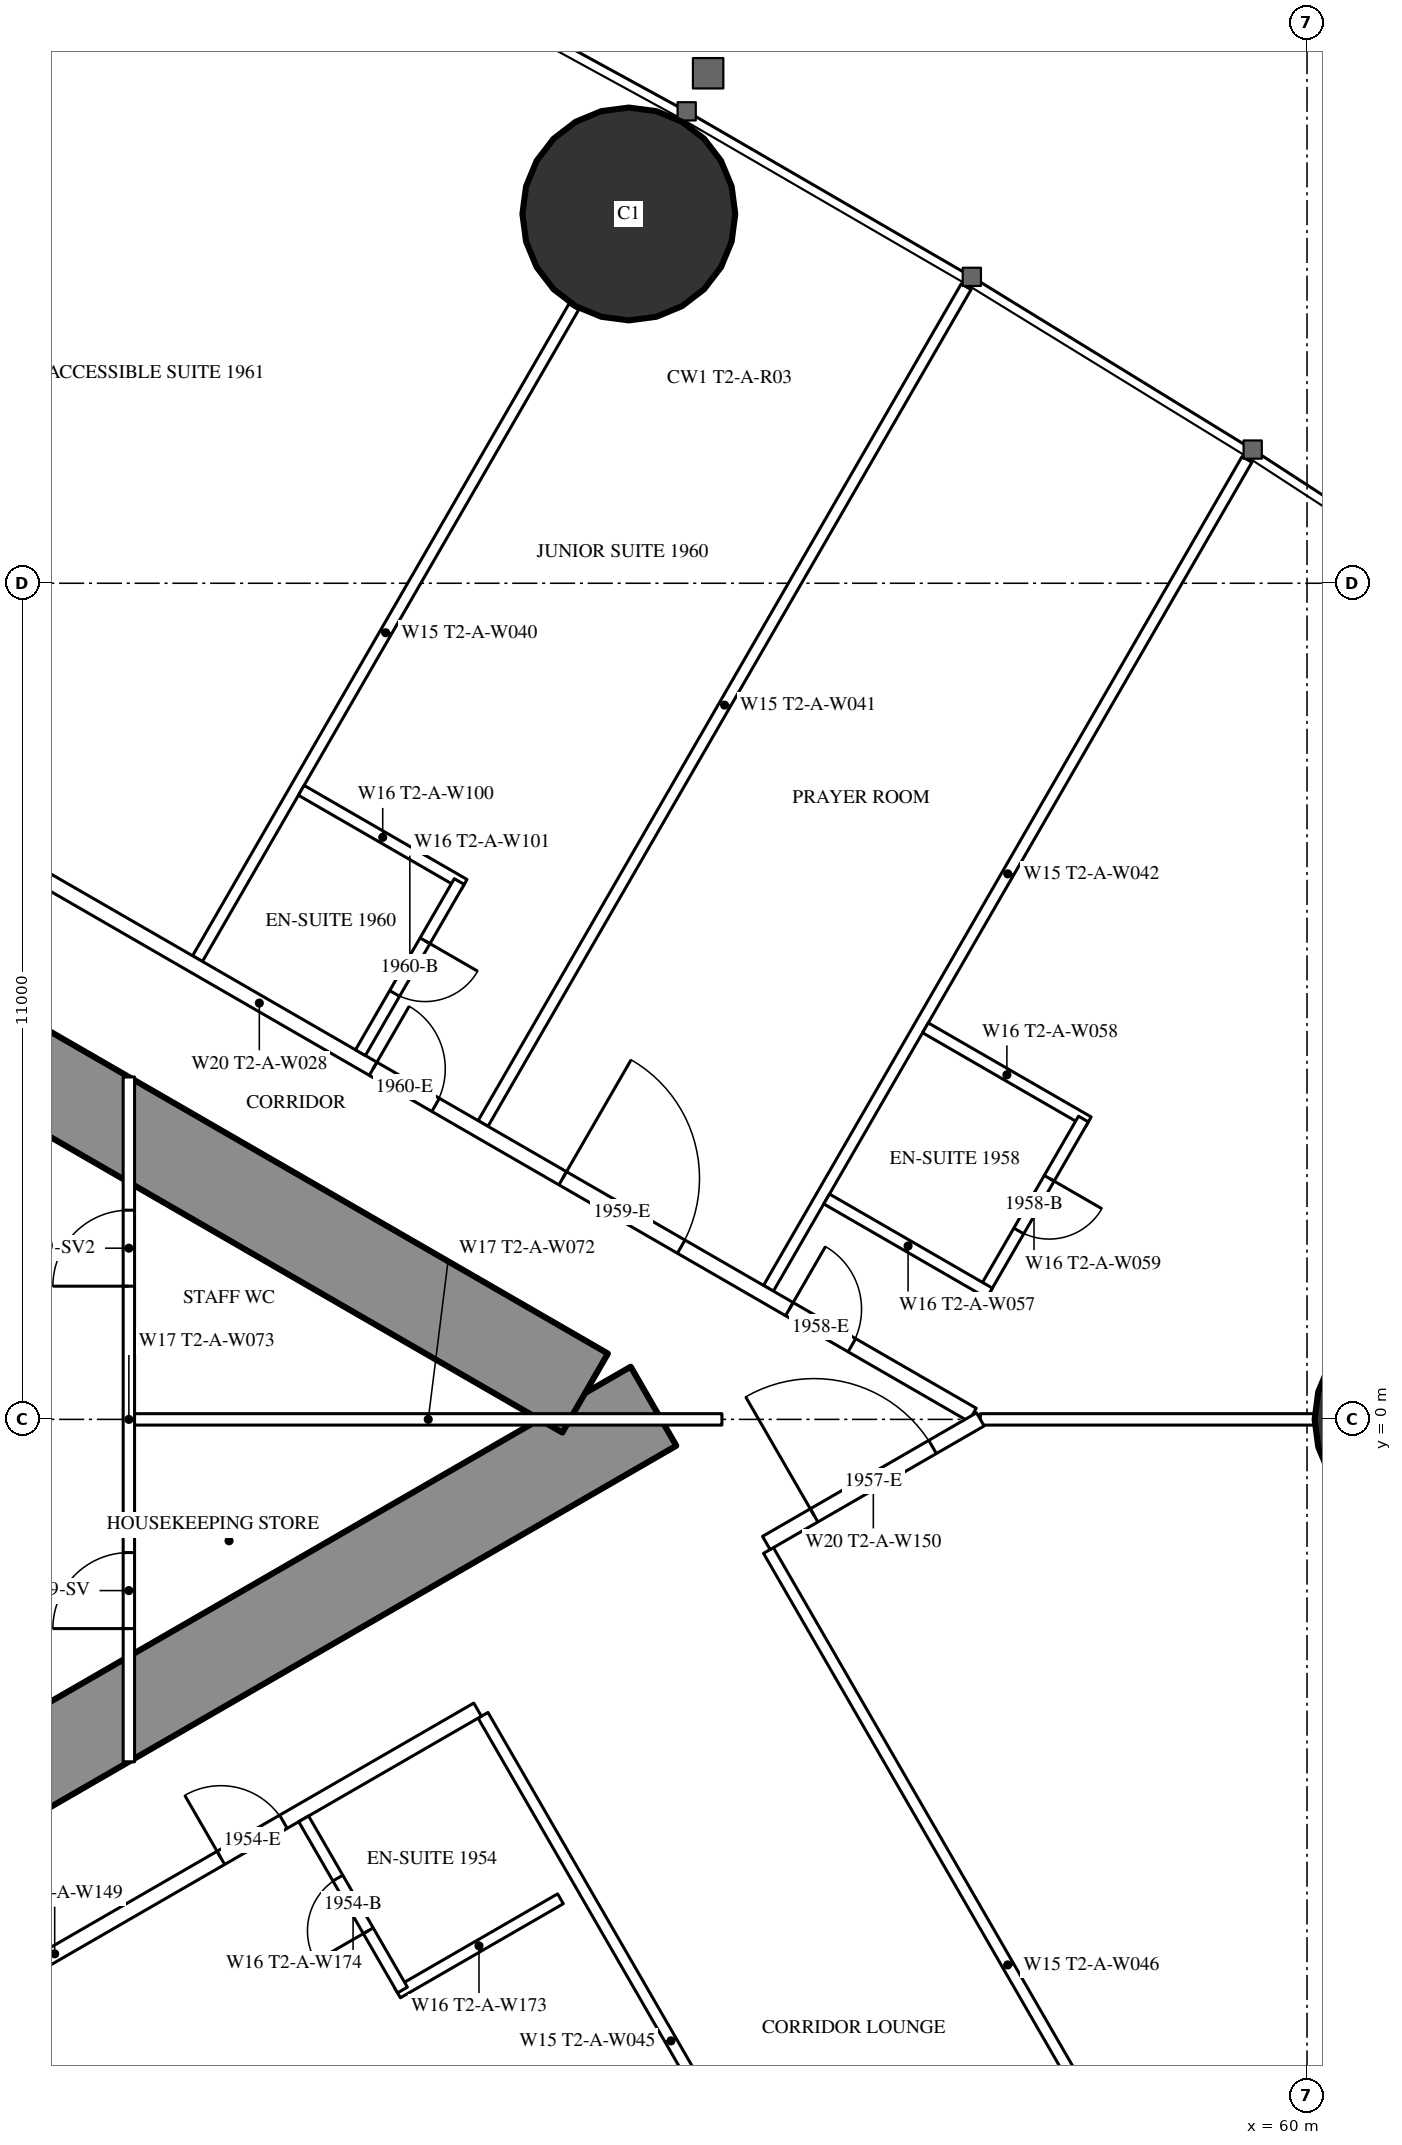
"""IFC4 building model, lengths in metres.
Left out: names, types, materials, properties, quantities, classifications, styles, units other than length and angle.
Written with IfcOpenShell. Run it as: python <this file> out.ifc"""

import sys

from ifc_helpers import new_model, si_unit, direction, frame, frame_2d, origin, origin_2d, place, context, subcontext, project, spatial, rectangle, hollow_circle, extrude, element, fill, save


model = new_model("IFC4")
c1 = context("Model", 3, precision=1e-05, world=origin(), true_north=direction((0.0, 1.0)))
c2 = subcontext(c1, "Body", "Model", "MODEL_VIEW")
j1 = project(units=[si_unit("LENGTHUNIT", "METRE"), si_unit("PLANEANGLEUNIT", "RADIAN")], contexts=[c1])
p1 = place(None, origin())
s1 = spatial("IfcSite", under=j1, at=p1, CompositionType="ELEMENT")
p2 = place(p1, origin())
s2 = spatial("IfcBuilding", under=s1, at=p2, CompositionType="ELEMENT")
p3 = place(p2, frame((0.0, 0.0, 74.0)))
s3 = spatial("IfcBuildingStorey", under=s2, at=p3, CompositionType="ELEMENT", Elevation=74.0)
p4 = place(p3, frame((51.078, 15.858, 0.0), z_axis=(0.0, 0.0, 1.0), x_axis=(1.0, 0.0, 0.0)))
e1 = element("IfcColumn", 1, at=p4, inside=s3, PredefinedType="COLUMN", context=c2, shape_type="SweptSolid", body=[
    extrude(hollow_circle(Radius=1.4, WallThickness=0.12, at=origin_2d()), origin(), (0.0, 0.0, 1.0), 3.5),
])
p5 = place(p3, frame((61.5, 0.0, 0.0), z_axis=(0.0, 0.0, 1.0), x_axis=(1.0, 0.0, 0.0)))
e2 = element("IfcColumn", 2, at=p5, inside=s3, PredefinedType="COLUMN", context=c2, shape_type="SweptSolid", body=[
    extrude(hollow_circle(Radius=1.4, WallThickness=0.1, at=origin_2d()), origin(), (0.0, 0.0, 1.0), 3.5),
])
p6 = place(p3, frame((27.2, -13.8, 0.0), z_axis=(0.0, 0.0, 1.0), x_axis=(0.866027159892, 0.499996958321, 0.0)))
e3 = element("IfcWall", 3, at=p6, inside=s3, PredefinedType="SHEAR", context=c2, shape_type="SweptSolid", body=[
    extrude(rectangle(XDim=27.947, YDim=1.2, at=frame_2d((13.973, 0.0))), origin(), (0.0, 0.0, 1.0), 3.5),
])
p7 = place(p6, frame((4.6, 0.0, 0.0)))
e4 = element("IfcOpeningElement", 4, at=p7, cuts=e3, PredefinedType="OPENING", context=c2, shape_type="SweptSolid", body=[
    extrude(rectangle(XDim=1.0, YDim=2.2, at=frame_2d((0.5, 1.1))), frame((0.0, 0.61, 0.0), z_axis=(0.0, -1.0, 0.0), x_axis=(1.0, 0.0, 0.0)), (0.0, 0.0, 1.0), 1.22),
])
p8 = place(p6, frame((13.395, 0.0, 0.0)))
e5 = element("IfcOpeningElement", 5, at=p8, cuts=e3, PredefinedType="OPENING", context=c2, shape_type="SweptSolid", body=[
    extrude(rectangle(XDim=1.8, YDim=2.2, at=frame_2d((0.9, 1.1))), frame((0.0, 0.61, 0.0), z_axis=(0.0, -1.0, 0.0), x_axis=(1.0, 0.0, 0.0)), (0.0, 0.0, 1.0), 1.22),
])
p9 = place(p3, frame((27.2, 13.8, 0.0), z_axis=(0.0, 0.0, 1.0), x_axis=(0.866024515034, -0.500001539357, 0.0)))
e6 = element("IfcWall", 6, at=p9, inside=s3, PredefinedType="SHEAR", context=c2, shape_type="SweptSolid", body=[
    extrude(rectangle(XDim=26.907, YDim=1.2, at=frame_2d((13.454, 0.0))), origin(), (0.0, 0.0, 1.0), 3.5),
])
p10 = place(p9, frame((4.6, 0.0, 0.0)))
e7 = element("IfcOpeningElement", 7, at=p10, cuts=e6, PredefinedType="OPENING", context=c2, shape_type="SweptSolid", body=[
    extrude(rectangle(XDim=1.0, YDim=2.2, at=frame_2d((0.5, 1.1))), frame((0.0, 0.61, 0.0), z_axis=(0.0, -1.0, 0.0), x_axis=(1.0, 0.0, 0.0)), (0.0, 0.0, 1.0), 1.22),
])
p11 = place(p9, frame((13.395, 0.0, 0.0)))
e8 = element("IfcOpeningElement", 8, at=p11, cuts=e6, PredefinedType="OPENING", context=c2, shape_type="SweptSolid", body=[
    extrude(rectangle(XDim=1.8, YDim=2.2, at=frame_2d((0.9, 1.1))), frame((0.0, 0.61, 0.0), z_axis=(0.0, -1.0, 0.0), x_axis=(1.0, 0.0, 0.0)), (0.0, 0.0, 1.0), 1.22),
])
p12 = place(p3, frame((41.647, -8.23, 0.0), z_axis=(0.0, 0.0, 1.0), x_axis=(0.49998590462, -0.866033541603, 0.0)))
e9 = element("IfcWall", 9, at=p12, inside=s3, PredefinedType="PARTITIONING", context=c2, shape_type="SweptSolid", body=[
    extrude(rectangle(XDim=12.621, YDim=0.15, at=frame_2d((6.311, 0.0))), origin(), (0.0, 0.0, 1.0), 3.25),
])
p13 = place(p3, frame((49.159, -3.893, 0.0), z_axis=(0.0, 0.0, 1.0), x_axis=(0.499998773722, -0.866026111775, 0.0)))
e10 = element("IfcWall", 10, at=p13, inside=s3, PredefinedType="PARTITIONING", context=c2, shape_type="SweptSolid", body=[
    extrude(rectangle(XDim=9.892, YDim=0.15, at=frame_2d((4.946, 0.0))), origin(), (0.0, 0.0, 1.0), 2.25),
])
p14 = place(p3, frame((52.915, -1.725, 0.0), z_axis=(0.0, 0.0, 1.0), x_axis=(0.499997163113, -0.866027041656, 0.0)))
e11 = element("IfcWall", 11, at=p14, inside=s3, PredefinedType="PARTITIONING", context=c2, shape_type="SweptSolid", body=[
    extrude(rectangle(XDim=12.591, YDim=0.15, at=frame_2d((6.295, 0.0))), origin(), (0.0, 0.0, 1.0), 3.25),
])
p15 = place(p3, frame((45.403, 6.062, 0.0), z_axis=(0.0, 0.0, 1.0), x_axis=(0.500013434677, 0.866017647131, 0.0)))
e12 = element("IfcWall", 12, at=p15, inside=s3, PredefinedType="PARTITIONING", context=c2, shape_type="SweptSolid", body=[
    extrude(rectangle(XDim=9.902, YDim=0.15, at=frame_2d((4.951, 0.0))), origin(), (0.0, 0.0, 1.0), 2.25),
])
p16 = place(p3, frame((49.159, 3.893, 0.0), z_axis=(0.0, 0.0, 1.0), x_axis=(0.499995664361, 0.866027906952, 0.0)))
e13 = element("IfcWall", 13, at=p16, inside=s3, PredefinedType="PARTITIONING", context=c2, shape_type="SweptSolid", body=[
    extrude(rectangle(XDim=12.711, YDim=0.15, at=frame_2d((6.356, 0.0))), origin(), (0.0, 0.0, 1.0), 3.25),
])
p17 = place(p3, frame((52.915, 1.725, 0.0), z_axis=(0.0, 0.0, 1.0), x_axis=(0.499997163113, 0.866027041656, 0.0)))
e14 = element("IfcWall", 14, at=p17, inside=s3, PredefinedType="PARTITIONING", context=c2, shape_type="SweptSolid", body=[
    extrude(rectangle(XDim=12.591, YDim=0.15, at=frame_2d((6.295, 0.0))), origin(), (0.0, 0.0, 1.0), 3.25),
])
p18 = place(p3, frame((55.702, 0.0, 0.0), z_axis=(0.0, 0.0, 1.0), x_axis=(1.0, 0.0, 0.0)))
e15 = element("IfcWall", 15, at=p18, inside=s3, PredefinedType="PARTITIONING", context=c2, shape_type="SweptSolid", body=[
    extrude(rectangle(XDim=16.117, YDim=0.15, at=frame_2d((8.059, 0.0))), origin(), (0.0, 0.0, 1.0), 2.25),
])
p19 = place(p3, frame((36.834, 10.894, 0.0), z_axis=(0.0, 0.0, 1.0), x_axis=(0.866028157229, -0.499995230863, 0.0)))
e16 = element("IfcWall", 16, at=p19, inside=s3, PredefinedType="PARTITIONING", context=c2, shape_type="SweptSolid", body=[
    extrude(rectangle(XDim=21.667, YDim=0.2, at=frame_2d((10.833, 0.0))), origin(), (0.0, 0.0, 1.0), 3.25),
])
p20 = place(p19, frame((18.885, 0.0, 0.0)))
e17 = element("IfcOpeningElement", 17, at=p20, cuts=e16, PredefinedType="OPENING", context=c2, shape_type="SweptSolid", body=[
    extrude(rectangle(XDim=0.95, YDim=2.2, at=frame_2d((0.475, 1.1))), frame((0.0, 0.11, 0.0), z_axis=(0.0, -1.0, 0.0), x_axis=(1.0, 0.0, 0.0)), (0.0, 0.0, 1.0), 0.22),
])
p21 = place(p19, frame((15.443, 0.0, 0.0)))
e18 = element("IfcOpeningElement", 18, at=p21, cuts=e16, PredefinedType="OPENING", context=c2, shape_type="SweptSolid", body=[
    extrude(rectangle(XDim=1.8, YDim=2.2, at=frame_2d((0.9, 1.1))), frame((0.0, 0.11, 0.0), z_axis=(0.0, -1.0, 0.0), x_axis=(1.0, 0.0, 0.0)), (0.0, 0.0, 1.0), 0.22),
])
p22 = place(p19, frame((12.562, 0.0, 0.0)))
e19 = element("IfcOpeningElement", 19, at=p22, cuts=e16, PredefinedType="OPENING", context=c2, shape_type="SweptSolid", body=[
    extrude(rectangle(XDim=0.95, YDim=2.2, at=frame_2d((0.475, 1.1))), frame((0.0, 0.11, 0.0), z_axis=(0.0, -1.0, 0.0), x_axis=(1.0, 0.0, 0.0)), (0.0, 0.0, 1.0), 0.22),
])
p23 = place(p19, frame((4.292, 0.0, 0.0)))
e20 = element("IfcOpeningElement", 20, at=p23, cuts=e16, PredefinedType="OPENING", context=c2, shape_type="SweptSolid", body=[
    extrude(rectangle(XDim=1.0, YDim=2.2, at=frame_2d((0.5, 1.1))), frame((0.0, 0.11, 0.0), z_axis=(0.0, -1.0, 0.0), x_axis=(1.0, 0.0, 0.0)), (0.0, 0.0, 1.0), 0.22),
])
p24 = place(p3, frame((37.96, -10.243, 0.0), z_axis=(0.0, 0.0, 1.0), x_axis=(0.866030548046, 0.499991089772, 0.0)))
e21 = element("IfcWall", 21, at=p24, inside=s3, PredefinedType="PARTITIONING", context=c2, shape_type="SweptSolid", body=[
    extrude(rectangle(XDim=12.849, YDim=0.2, at=frame_2d((6.425, 0.0))), origin(), (0.0, 0.0, 1.0), 3.25),
])
p25 = place(p24, frame((8.949, 0.0, 0.0)))
e22 = element("IfcOpeningElement", 22, at=p25, cuts=e21, PredefinedType="OPENING", context=c2, shape_type="SweptSolid", body=[
    extrude(rectangle(XDim=0.95, YDim=2.2, at=frame_2d((0.475, 1.1))), frame((0.0, 0.11, 0.0), z_axis=(0.0, -1.0, 0.0), x_axis=(1.0, 0.0, 0.0)), (0.0, 0.0, 1.0), 0.22),
])
p26 = place(p24, frame((0.6, 0.0, 0.0)))
e23 = element("IfcOpeningElement", 23, at=p26, cuts=e21, PredefinedType="OPENING", context=c2, shape_type="SweptSolid", body=[
    extrude(rectangle(XDim=0.95, YDim=2.2, at=frame_2d((0.475, 1.1))), frame((0.0, 0.11, 0.0), z_axis=(0.0, -1.0, 0.0), x_axis=(1.0, 0.0, 0.0)), (0.0, 0.0, 1.0), 0.22),
])
p27 = place(p3, frame((52.886, -1.626, 0.0), z_axis=(0.0, 0.0, 1.0), x_axis=(0.866030540913, 0.499991102127, 0.0)))
e24 = element("IfcWall", 24, at=p27, inside=s3, PredefinedType="PARTITIONING", context=c2, shape_type="SweptSolid", body=[
    extrude(rectangle(XDim=3.251, YDim=0.2, at=frame_2d((1.626, 0.0))), origin(), (0.0, 0.0, 1.0), 3.25),
])
p28 = place(p27, frame((0.726, 0.0, 0.0)))
e25 = element("IfcOpeningElement", 25, at=p28, cuts=e24, PredefinedType="OPENING", context=c2, shape_type="SweptSolid", body=[
    extrude(rectangle(XDim=1.8, YDim=2.2, at=frame_2d((0.9, 1.1))), frame((0.0, 0.11, 0.0), z_axis=(0.0, -1.0, 0.0), x_axis=(1.0, 0.0, 0.0)), (0.0, 0.0, 1.0), 0.22),
])
p29 = place(p3, frame((48.035, -7.545, 0.0), z_axis=(0.0, 0.0, 1.0), x_axis=(0.866006523861, 0.500032699561, 0.0)))
e26 = element("IfcWall", 26, at=p29, inside=s3, PredefinedType="PARTITIONING", context=c2, shape_type="SweptSolid", body=[
    extrude(rectangle(XDim=2.475, YDim=0.15, at=frame_2d((1.237, 0.0))), origin(), (0.0, 0.0, 1.0), 3.25),
])
p30 = place(p3, frame((46.8, -5.255, 0.0), z_axis=(0.0, 0.0, 1.0), x_axis=(0.500006934395, -0.866021400173, 0.0)))
e27 = element("IfcWall", 27, at=p30, inside=s3, PredefinedType="PARTITIONING", context=c2, shape_type="SweptSolid", body=[
    extrude(rectangle(XDim=2.6, YDim=0.15, at=frame_2d((1.3, 0.0))), origin(), (0.0, 0.0, 1.0), 3.25),
])
p31 = place(p30, frame((0.9, 0.0, 0.0)))
e28 = element("IfcOpeningElement", 28, at=p31, cuts=e27, PredefinedType="OPENING", context=c2, shape_type="SweptSolid", body=[
    extrude(rectangle(XDim=0.8, YDim=2.2, at=frame_2d((0.4, 1.1))), frame((0.0, 0.085, 0.0), z_axis=(0.0, -1.0, 0.0), x_axis=(1.0, 0.0, 0.0)), (0.0, 0.0, 1.0), 0.17),
])
p32 = place(p3, frame((54.98, 5.151, 0.0), z_axis=(0.0, 0.0, 1.0), x_axis=(0.86604923931, -0.499958713387, 0.0)))
e29 = element("IfcWall", 29, at=p32, inside=s3, PredefinedType="PARTITIONING", context=c2, shape_type="SweptSolid", body=[
    extrude(rectangle(XDim=2.475, YDim=0.15, at=frame_2d((1.237, 0.0))), origin(), (0.0, 0.0, 1.0), 3.25),
])
p33 = place(p3, frame((55.758, 1.7, 0.0), z_axis=(0.0, 0.0, 1.0), x_axis=(0.500006934395, 0.866021400173, 0.0)))
e30 = element("IfcWall", 30, at=p33, inside=s3, PredefinedType="PARTITIONING", context=c2, shape_type="SweptSolid", body=[
    extrude(rectangle(XDim=2.6, YDim=0.15, at=frame_2d((1.3, 0.0))), origin(), (0.0, 0.0, 1.0), 3.25),
])
p34 = place(p33, frame((0.9, 0.0, 0.0)))
e31 = element("IfcOpeningElement", 31, at=p34, cuts=e30, PredefinedType="OPENING", context=c2, shape_type="SweptSolid", body=[
    extrude(rectangle(XDim=0.8, YDim=2.2, at=frame_2d((0.4, 1.1))), frame((0.0, 0.085, 0.0), z_axis=(0.0, -1.0, 0.0), x_axis=(1.0, 0.0, 0.0)), (0.0, 0.0, 1.0), 0.17),
])
p35 = place(p3, frame((53.68, 2.9, 0.0), z_axis=(0.0, 0.0, 1.0), x_axis=(0.866006523861, -0.500032699561, 0.0)))
e32 = element("IfcWall", 32, at=p35, inside=s3, PredefinedType="PARTITIONING", context=c2, shape_type="SweptSolid", body=[
    extrude(rectangle(XDim=2.475, YDim=0.15, at=frame_2d((1.237, 0.0))), origin(), (0.0, 0.0, 1.0), 3.25),
])
p36 = place(p3, frame((46.768, 8.276, 0.0), z_axis=(0.0, 0.0, 1.0), x_axis=(0.866031185235, -0.4999899861, 0.0)))
e33 = element("IfcWall", 33, at=p36, inside=s3, PredefinedType="PARTITIONING", context=c2, shape_type="SweptSolid", body=[
    extrude(rectangle(XDim=2.475, YDim=0.15, at=frame_2d((1.238, 0.0))), origin(), (0.0, 0.0, 1.0), 3.25),
])
p37 = place(p3, frame((47.546, 4.824, 0.0), z_axis=(0.0, 0.0, 1.0), x_axis=(0.500006934395, 0.866021400173, 0.0)))
e34 = element("IfcWall", 34, at=p37, inside=s3, PredefinedType="PARTITIONING", context=c2, shape_type="SweptSolid", body=[
    extrude(rectangle(XDim=2.6, YDim=0.15, at=frame_2d((1.3, 0.0))), origin(), (0.0, 0.0, 1.0), 3.25),
])
p38 = place(p37, frame((0.9, 0.0, 0.0)))
e35 = element("IfcOpeningElement", 35, at=p38, cuts=e34, PredefinedType="OPENING", context=c2, shape_type="SweptSolid", body=[
    extrude(rectangle(XDim=0.8, YDim=2.2, at=frame_2d((0.4, 1.1))), frame((0.0, 0.085, 0.0), z_axis=(0.0, -1.0, 0.0), x_axis=(1.0, 0.0, 0.0)), (0.0, 0.0, 1.0), 0.17),
])
p39 = place(p3, frame((44.5, -4.505, 0.0), z_axis=(0.0, 0.0, 1.0), x_axis=(0.0, 1.0, 0.0)))
e36 = element("IfcWall", 36, at=p39, inside=s3, PredefinedType="PARTITIONING", context=c2, shape_type="SweptSolid", body=[
    extrude(rectangle(XDim=9.009, YDim=0.15, at=frame_2d((4.505, 0.0))), origin(), (0.0, 0.0, 1.0), 2.45),
])
p40 = place(p39, frame((1.752, 0.0, 0.0)))
e37 = element("IfcOpeningElement", 37, at=p40, cuts=e36, PredefinedType="OPENING", context=c2, shape_type="SweptSolid", body=[
    extrude(rectangle(XDim=1.0, YDim=2.2, at=frame_2d((0.5, 1.1))), frame((0.0, 0.085, 0.0), z_axis=(0.0, -1.0, 0.0), x_axis=(1.0, 0.0, 0.0)), (0.0, 0.0, 1.0), 0.17),
])
p41 = place(p39, frame((6.257, 0.0, 0.0)))
e38 = element("IfcOpeningElement", 38, at=p41, cuts=e36, PredefinedType="OPENING", context=c2, shape_type="SweptSolid", body=[
    extrude(rectangle(XDim=1.0, YDim=2.2, at=frame_2d((0.5, 1.1))), frame((0.0, 0.085, 0.0), z_axis=(0.0, -1.0, 0.0), x_axis=(1.0, 0.0, 0.0)), (0.0, 0.0, 1.0), 0.17),
])
p42 = place(p3, frame((44.575, 0.0, 0.0), z_axis=(0.0, 0.0, 1.0), x_axis=(1.0, 0.0, 0.0)))
e39 = element("IfcWall", 39, at=p42, inside=s3, PredefinedType="PARTITIONING", context=c2, shape_type="SweptSolid", body=[
    extrude(rectangle(XDim=7.727, YDim=0.15, at=frame_2d((3.864, 0.0))), origin(), (0.0, 0.0, 1.0), 2.25),
])
p43 = place(p31, origin())
e40 = element("IfcDoor", 40, at=p43, inside=s3, OperationType="SINGLE_SWING_RIGHT", PredefinedType="DOOR", context=c2, shape_type="SweptSolid", body=[
    extrude(rectangle(XDim=0.8, YDim=2.2, at=frame_2d((0.4, 1.1))), frame((0.0, 0.025, 0.0), z_axis=(0.0, -1.0, 0.0), x_axis=(1.0, 0.0, 0.0)), (0.0, 0.0, 1.0), 0.05),
])
fill(e28, e40)
p44 = place(p25, origin())
e41 = element("IfcDoor", 41, at=p44, inside=s3, OperationType="SINGLE_SWING_LEFT", PredefinedType="DOOR", context=c2, shape_type="SweptSolid", body=[
    extrude(rectangle(XDim=0.95, YDim=2.2, at=frame_2d((0.475, 1.1))), frame((0.0, 0.025, 0.0), z_axis=(0.0, -1.0, 0.0), x_axis=(1.0, 0.0, 0.0)), (0.0, 0.0, 1.0), 0.05),
])
fill(e22, e41)
p45 = place(p28, origin())
e42 = element("IfcDoor", 42, at=p45, inside=s3, OperationType="DOUBLE_DOOR_SINGLE_SWING", PredefinedType="DOOR", context=c2, shape_type="SweptSolid", body=[
    extrude(rectangle(XDim=1.8, YDim=2.2, at=frame_2d((0.9, 1.1))), frame((0.0, 0.025, 0.0), z_axis=(0.0, -1.0, 0.0), x_axis=(1.0, 0.0, 0.0)), (0.0, 0.0, 1.0), 0.05),
])
fill(e25, e42)
p46 = place(p34, origin())
e43 = element("IfcDoor", 43, at=p46, inside=s3, OperationType="SINGLE_SWING_RIGHT", PredefinedType="DOOR", context=c2, shape_type="SweptSolid", body=[
    extrude(rectangle(XDim=0.8, YDim=2.2, at=frame_2d((0.4, 1.1))), frame((0.0, 0.025, 0.0), z_axis=(0.0, -1.0, 0.0), x_axis=(1.0, 0.0, 0.0)), (0.0, 0.0, 1.0), 0.05),
])
fill(e31, e43)
p47 = place(p20, origin())
e44 = element("IfcDoor", 44, at=p47, inside=s3, OperationType="SINGLE_SWING_LEFT", PredefinedType="DOOR", context=c2, shape_type="SweptSolid", body=[
    extrude(rectangle(XDim=0.95, YDim=2.2, at=frame_2d((0.475, 1.1))), frame((0.0, 0.025, 0.0), z_axis=(0.0, -1.0, 0.0), x_axis=(1.0, 0.0, 0.0)), (0.0, 0.0, 1.0), 0.05),
])
fill(e17, e44)
p48 = place(p21, origin())
e45 = element("IfcDoor", 45, at=p48, inside=s3, OperationType="DOUBLE_DOOR_SINGLE_SWING", PredefinedType="DOOR", context=c2, shape_type="SweptSolid", body=[
    extrude(rectangle(XDim=1.8, YDim=2.2, at=frame_2d((0.9, 1.1))), frame((0.0, 0.025, 0.0), z_axis=(0.0, -1.0, 0.0), x_axis=(1.0, 0.0, 0.0)), (0.0, 0.0, 1.0), 0.05),
])
fill(e18, e45)
p49 = place(p38, origin())
e46 = element("IfcDoor", 46, at=p49, inside=s3, OperationType="SINGLE_SWING_RIGHT", PredefinedType="DOOR", context=c2, shape_type="SweptSolid", body=[
    extrude(rectangle(XDim=0.8, YDim=2.2, at=frame_2d((0.4, 1.1))), frame((0.0, 0.025, 0.0), z_axis=(0.0, -1.0, 0.0), x_axis=(1.0, 0.0, 0.0)), (0.0, 0.0, 1.0), 0.05),
])
fill(e35, e46)
p50 = place(p22, origin())
e47 = element("IfcDoor", 47, at=p50, inside=s3, OperationType="SINGLE_SWING_LEFT", PredefinedType="DOOR", context=c2, shape_type="SweptSolid", body=[
    extrude(rectangle(XDim=0.95, YDim=2.2, at=frame_2d((0.475, 1.1))), frame((0.0, 0.025, 0.0), z_axis=(0.0, -1.0, 0.0), x_axis=(1.0, 0.0, 0.0)), (0.0, 0.0, 1.0), 0.05),
])
fill(e19, e47)
p51 = place(p40, origin())
e48 = element("IfcDoor", 48, at=p51, inside=s3, OperationType="SINGLE_SWING_LEFT", PredefinedType="DOOR", context=c2, shape_type="SweptSolid", body=[
    extrude(rectangle(XDim=1.0, YDim=2.2, at=frame_2d((0.5, 1.1))), frame((0.0, 0.025, 0.0), z_axis=(0.0, -1.0, 0.0), x_axis=(1.0, 0.0, 0.0)), (0.0, 0.0, 1.0), 0.05),
])
fill(e37, e48)
p52 = place(p41, origin())
e49 = element("IfcDoor", 49, at=p52, inside=s3, OperationType="SINGLE_SWING_LEFT", PredefinedType="DOOR", context=c2, shape_type="SweptSolid", body=[
    extrude(rectangle(XDim=1.0, YDim=2.2, at=frame_2d((0.5, 1.1))), frame((0.0, 0.025, 0.0), z_axis=(0.0, -1.0, 0.0), x_axis=(1.0, 0.0, 0.0)), (0.0, 0.0, 1.0), 0.05),
])
fill(e38, e49)
save(model, sys.argv[1])
